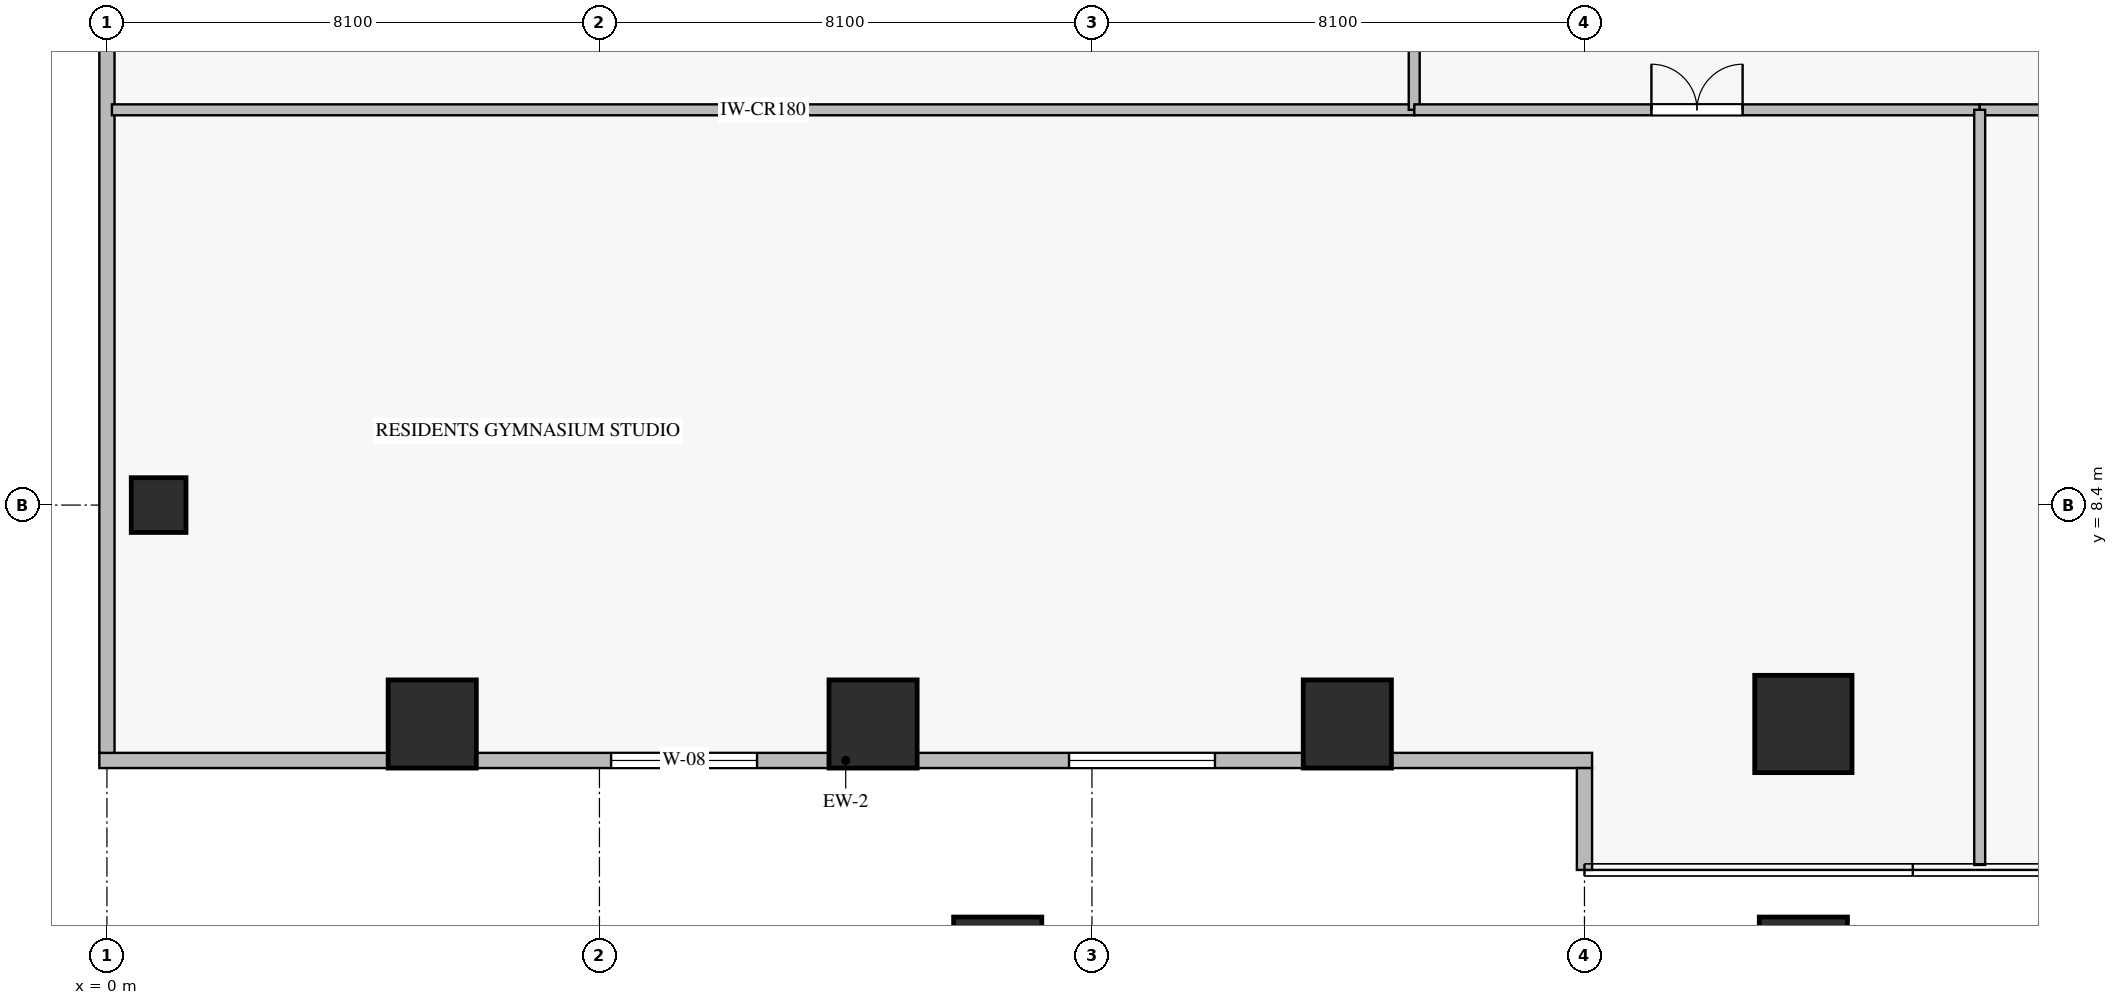
"""IFC4 building model, lengths in metres.
Left out: names, types, materials, properties, quantities, classifications, styles, units other than length and angle.
Written with IfcOpenShell. Run it as: python <this file> out.ifc"""

import sys

from ifc_helpers import new_model, si_unit, direction, frame, frame_2d, origin, origin_2d, place, context, subcontext, project, spatial, rectangle, extrude, source, transform, mapped, element, fill, save


model = new_model("IFC4")
c1 = context("Model", 3, precision=1e-05, world=origin(), true_north=direction((0.0, 1.0)))
c2 = subcontext(c1, "Body", "Model", "MODEL_VIEW")
j1 = project(units=[si_unit("LENGTHUNIT", "METRE"), si_unit("PLANEANGLEUNIT", "RADIAN")], contexts=[c1])
p1 = place(None, origin())
s1 = spatial("IfcSite", under=j1, at=p1, CompositionType="ELEMENT")
p2 = place(p1, origin())
s2 = spatial("IfcBuilding", under=s1, at=p2, CompositionType="ELEMENT")
p3 = place(p2, frame((0.0, 0.0, 10.5)))
s3 = spatial("IfcBuildingStorey", under=s2, at=p3, CompositionType="ELEMENT", Elevation=10.5)
m1 = source(origin(), c2, "Body", "SweptSolid", [
    extrude(rectangle(XDim=0.9, YDim=0.9, at=origin_2d()), origin(), (0.0, 0.0, 1.0), 4.8),
])
p4 = place(p3, frame((0.85, 8.4, -0.38), z_axis=(0.0, 0.0, 1.0), x_axis=(1.0, 0.0, 0.0)))
e1 = element("IfcColumn", 1, at=p4, inside=s3, PredefinedType="COLUMN", context=c2, shape_type="MappedRepresentation", body=[
    mapped(m1, transform((0.0, 0.0, 0.0), scale=1.0)),
])
m2 = source(origin(), c2, "Body", "SweptSolid", [
    extrude(rectangle(XDim=1.45, YDim=1.45, at=origin_2d()), origin(), (0.0, 0.0, 1.0), 4.8),
])
for number, where, z_axis, x_axis in (
    (2, (12.6, 4.8, -0.38), (0.0, 0.0, 1.0), (1.0, 0.0, 0.0)),
    (3, (20.4, 4.8, -0.38), (0.0, 0.0, 1.0), (1.0, 0.0, 0.0)),
):
    element("IfcColumn", number, at=place(p3, frame(where, z_axis=z_axis, x_axis=x_axis)), inside=s3, PredefinedType="COLUMN", context=c2, shape_type="MappedRepresentation", body=[
        mapped(m2, transform((0.0, 0.0, 0.0), scale=1.0)),
    ])
m3 = source(origin(), c2, "Body", "SweptSolid", [
    extrude(rectangle(XDim=1.6, YDim=1.6, at=origin_2d()), origin(), (0.0, 0.0, 1.0), 4.8),
])
p5 = place(p3, frame((27.9, 4.8, -0.38), z_axis=(0.0, 0.0, 1.0), x_axis=(1.0, 0.0, 0.0)))
e4 = element("IfcColumn", 4, at=p5, inside=s3, PredefinedType="COLUMN", context=c2, shape_type="MappedRepresentation", body=[
    mapped(m3, transform((0.0, 0.0, 0.0), scale=1.0)),
])
for number, where, z_axis, x_axis in (
    (5, (14.65, 0.9, -0.38), (0.0, 0.0, 1.0), (1.0, 0.0, 0.0)),
    (6, (27.9, 0.9, -0.38), (0.0, 0.0, 1.0), (1.0, 0.0, 0.0)),
    (7, (5.35, 4.8, -0.38), (0.0, 0.0, 1.0), (1.0, 0.0, 0.0)),
):
    element("IfcColumn", number, at=place(p3, frame(where, z_axis=z_axis, x_axis=x_axis)), inside=s3, PredefinedType="COLUMN", context=c2, shape_type="MappedRepresentation", body=[
        mapped(m2, transform((0.0, 0.0, 0.0), scale=1.0)),
    ])
p6 = place(p3, frame((-0.125, 4.2, 0.0), z_axis=(0.0, 0.0, 1.0), x_axis=(1.0, 0.0, 0.0)))
e8 = element("IfcWall", 8, at=p6, inside=s3, PredefinedType="ELEMENTEDWALL", context=c2, shape_type="SweptSolid", body=[
    extrude(rectangle(XDim=24.55, YDim=0.25, at=frame_2d((12.275, 0.0))), origin(), (0.0, 0.0, 1.0), 4.405),
])
p7 = place(p6, frame((8.417, 0.0, 0.6)))
e9 = element("IfcOpeningElement", 9, at=p7, cuts=e8, PredefinedType="OPENING", context=c2, shape_type="SweptSolid", body=[
    extrude(rectangle(XDim=2.4, YDim=2.6, at=frame_2d((1.2, 1.3))), frame((0.0, 0.135, 0.0), z_axis=(0.0, -1.0, 0.0), x_axis=(1.0, 0.0, 0.0)), (0.0, 0.0, 1.0), 0.27),
])
p8 = place(p6, frame((15.948, 0.0, 0.6)))
e10 = element("IfcOpeningElement", 10, at=p8, cuts=e8, PredefinedType="OPENING", context=c2, shape_type="SweptSolid", body=[
    extrude(rectangle(XDim=2.4, YDim=2.6, at=frame_2d((1.2, 1.3))), frame((0.0, 0.135, 0.0), z_axis=(0.0, -1.0, 0.0), x_axis=(1.0, 0.0, 0.0)), (0.0, 0.0, 1.0), 0.27),
])
p9 = place(p3, frame((24.3, 4.075, 0.0), z_axis=(0.0, 0.0, 1.0), x_axis=(0.0, -1.0, 0.0)))
e11 = element("IfcWall", 11, at=p9, inside=s3, PredefinedType="ELEMENTEDWALL", context=c2, shape_type="SweptSolid", body=[
    extrude(rectangle(XDim=1.675, YDim=0.25, at=frame_2d((0.837, 0.0))), origin(), (0.0, 0.0, 1.0), 4.405),
])
p10 = place(p3, frame((0.0, 46.075, 0.0), z_axis=(0.0, 0.0, 1.0), x_axis=(0.0, -1.0, 0.0)))
e12 = element("IfcWall", 12, at=p10, inside=s3, PredefinedType="ELEMENTEDWALL", context=c2, shape_type="SweptSolid", body=[
    extrude(rectangle(XDim=41.75, YDim=0.25, at=frame_2d((20.875, 0.0))), origin(), (0.0, 0.0, 1.0), 4.405),
])
p11 = place(p10, frame((7.87, 0.0, 0.6)))
e13 = element("IfcOpeningElement", 13, at=p11, cuts=e12, PredefinedType="OPENING", context=c2, shape_type="SweptSolid", body=[
    extrude(rectangle(XDim=2.4, YDim=2.6, at=frame_2d((1.2, 1.3))), frame((0.0, 0.135, 0.0), z_axis=(0.0, -1.0, 0.0), x_axis=(1.0, 0.0, 0.0)), (0.0, 0.0, 1.0), 0.27),
])
p12 = place(p10, frame((24.397, 0.0, 0.6)))
e14 = element("IfcOpeningElement", 14, at=p12, cuts=e12, PredefinedType="OPENING", context=c2, shape_type="SweptSolid", body=[
    extrude(rectangle(XDim=2.4, YDim=2.6, at=frame_2d((1.2, 1.3))), frame((0.0, 0.135, 0.0), z_axis=(0.0, -1.0, 0.0), x_axis=(1.0, 0.0, 0.0)), (0.0, 0.0, 1.0), 0.27),
])
p13 = place(p3, frame((0.082, 14.9, 0.0), z_axis=(0.0, 0.0, 1.0), x_axis=(1.0, 0.0, 0.0)))
e15 = element("IfcWall", 15, at=p13, inside=s3, PredefinedType="PARTITIONING", context=c2, shape_type="SweptSolid", body=[
    extrude(rectangle(XDim=21.418, YDim=0.18, at=frame_2d((10.709, 0.0))), origin(), (0.0, 0.0, 1.0), 4.42),
])
p14 = place(p3, frame((21.5, 14.9, 0.0), z_axis=(0.0, 0.0, 1.0), x_axis=(0.0, 1.0, 0.0)))
e16 = element("IfcWall", 16, at=p14, inside=s3, PredefinedType="PARTITIONING", context=c2, shape_type="SweptSolid", body=[
    extrude(rectangle(XDim=18.18, YDim=0.18, at=frame_2d((9.09, 0.0))), origin(), (0.0, 0.0, 1.0), 4.42),
])
p15 = place(p14, frame((8.34, 0.0, 0.0)))
e17 = element("IfcOpeningElement", 17, at=p15, cuts=e16, PredefinedType="OPENING", context=c2, shape_type="SweptSolid", body=[
    extrude(rectangle(XDim=1.5, YDim=2.25, at=frame_2d((0.75, 1.125))), frame((0.0, 0.1, 0.0), z_axis=(0.0, -1.0, 0.0), x_axis=(1.0, 0.0, 0.0)), (0.0, 0.0, 1.0), 0.2),
])
p16 = place(p3, frame((21.502, 14.9, 0.0), z_axis=(0.0, 0.0, 1.0), x_axis=(1.0, 0.0, 0.0)))
e18 = element("IfcWall", 18, at=p16, inside=s3, PredefinedType="PARTITIONING", context=c2, shape_type="SweptSolid", body=[
    extrude(rectangle(XDim=9.298, YDim=0.18, at=frame_2d((4.649, 0.0))), origin(), (0.0, 0.0, 1.0), 4.42),
])
p17 = place(p16, frame((3.899, 0.0, 0.0)))
e19 = element("IfcOpeningElement", 19, at=p17, cuts=e18, PredefinedType="OPENING", context=c2, shape_type="SweptSolid", body=[
    extrude(rectangle(XDim=1.5, YDim=2.25, at=frame_2d((0.75, 1.125))), frame((0.0, 0.1, 0.0), z_axis=(0.0, -1.0, 0.0), x_axis=(1.0, 0.0, 0.0)), (0.0, 0.0, 1.0), 0.2),
])
p18 = place(p3, frame((30.802, 14.9, 0.0), z_axis=(0.0, 0.0, 1.0), x_axis=(1.0, 0.0, 0.0)))
e20 = element("IfcWall", 20, at=p18, inside=s3, PredefinedType="PARTITIONING", context=c2, shape_type="SweptSolid", body=[
    extrude(rectangle(XDim=9.898, YDim=0.18, at=frame_2d((4.949, 0.0))), origin(), (0.0, 0.0, 1.0), 4.42),
])
p19 = place(p18, frame((4.149, 0.0, 0.0)))
e21 = element("IfcOpeningElement", 21, at=p19, cuts=e20, PredefinedType="OPENING", context=c2, shape_type="SweptSolid", body=[
    extrude(rectangle(XDim=1.6, YDim=2.3, at=frame_2d((0.8, 1.15))), frame((0.0, 0.1, 0.0), z_axis=(0.0, -1.0, 0.0), x_axis=(1.0, 0.0, 0.0)), (0.0, 0.0, 1.0), 0.2),
])
p20 = place(p3, frame((30.8, 2.482, 0.0), z_axis=(0.0, 0.0, 1.0), x_axis=(0.0, 1.0, 0.0)))
e22 = element("IfcWall", 22, at=p20, inside=s3, PredefinedType="PARTITIONING", context=c2, shape_type="SweptSolid", body=[
    extrude(rectangle(XDim=12.418, YDim=0.18, at=frame_2d((6.209, 0.0))), origin(), (0.0, 0.0, 1.0), 4.42),
])
m4 = source(origin(), c2, "Body", "SweptSolid", [
    extrude(rectangle(XDim=2.4, YDim=2.6, at=frame_2d((1.2, 1.3))), frame((0.0, 0.03, 0.0), z_axis=(0.0, -1.0, 0.0), x_axis=(1.0, 0.0, 0.0)), (0.0, 0.0, 1.0), 0.06),
])
p21 = place(p7, origin())
e23 = element("IfcWindow", 23, at=p21, inside=s3, PartitioningType="SINGLE_PANEL", PredefinedType="WINDOW", context=c2, shape_type="MappedRepresentation", body=[
    mapped(m4, transform((0.0, 0.0, 0.0), scale=1.0)),
])
fill(e9, e23)
p22 = place(p8, origin())
e24 = element("IfcWindow", 24, at=p22, inside=s3, PartitioningType="SINGLE_PANEL", PredefinedType="WINDOW", context=c2, shape_type="MappedRepresentation", body=[
    mapped(m4, transform((0.0, 0.0, 0.0), scale=1.0)),
])
fill(e10, e24)
m5 = source(origin(), c2, "Body", "SweptSolid", [
    extrude(rectangle(XDim=1.5, YDim=2.25, at=frame_2d((0.75, 1.125))), frame((0.0, 0.025, 0.0), z_axis=(0.0, -1.0, 0.0), x_axis=(1.0, 0.0, 0.0)), (0.0, 0.0, 1.0), 0.05),
])
p23 = place(p17, origin())
e25 = element("IfcDoor", 25, at=p23, inside=s3, OperationType="DOUBLE_DOOR_SINGLE_SWING", PredefinedType="DOOR", context=c2, shape_type="MappedRepresentation", body=[
    mapped(m5, transform((0.0, 0.0, 0.0), scale=1.0)),
])
fill(e19, e25)
save(model, sys.argv[1])
